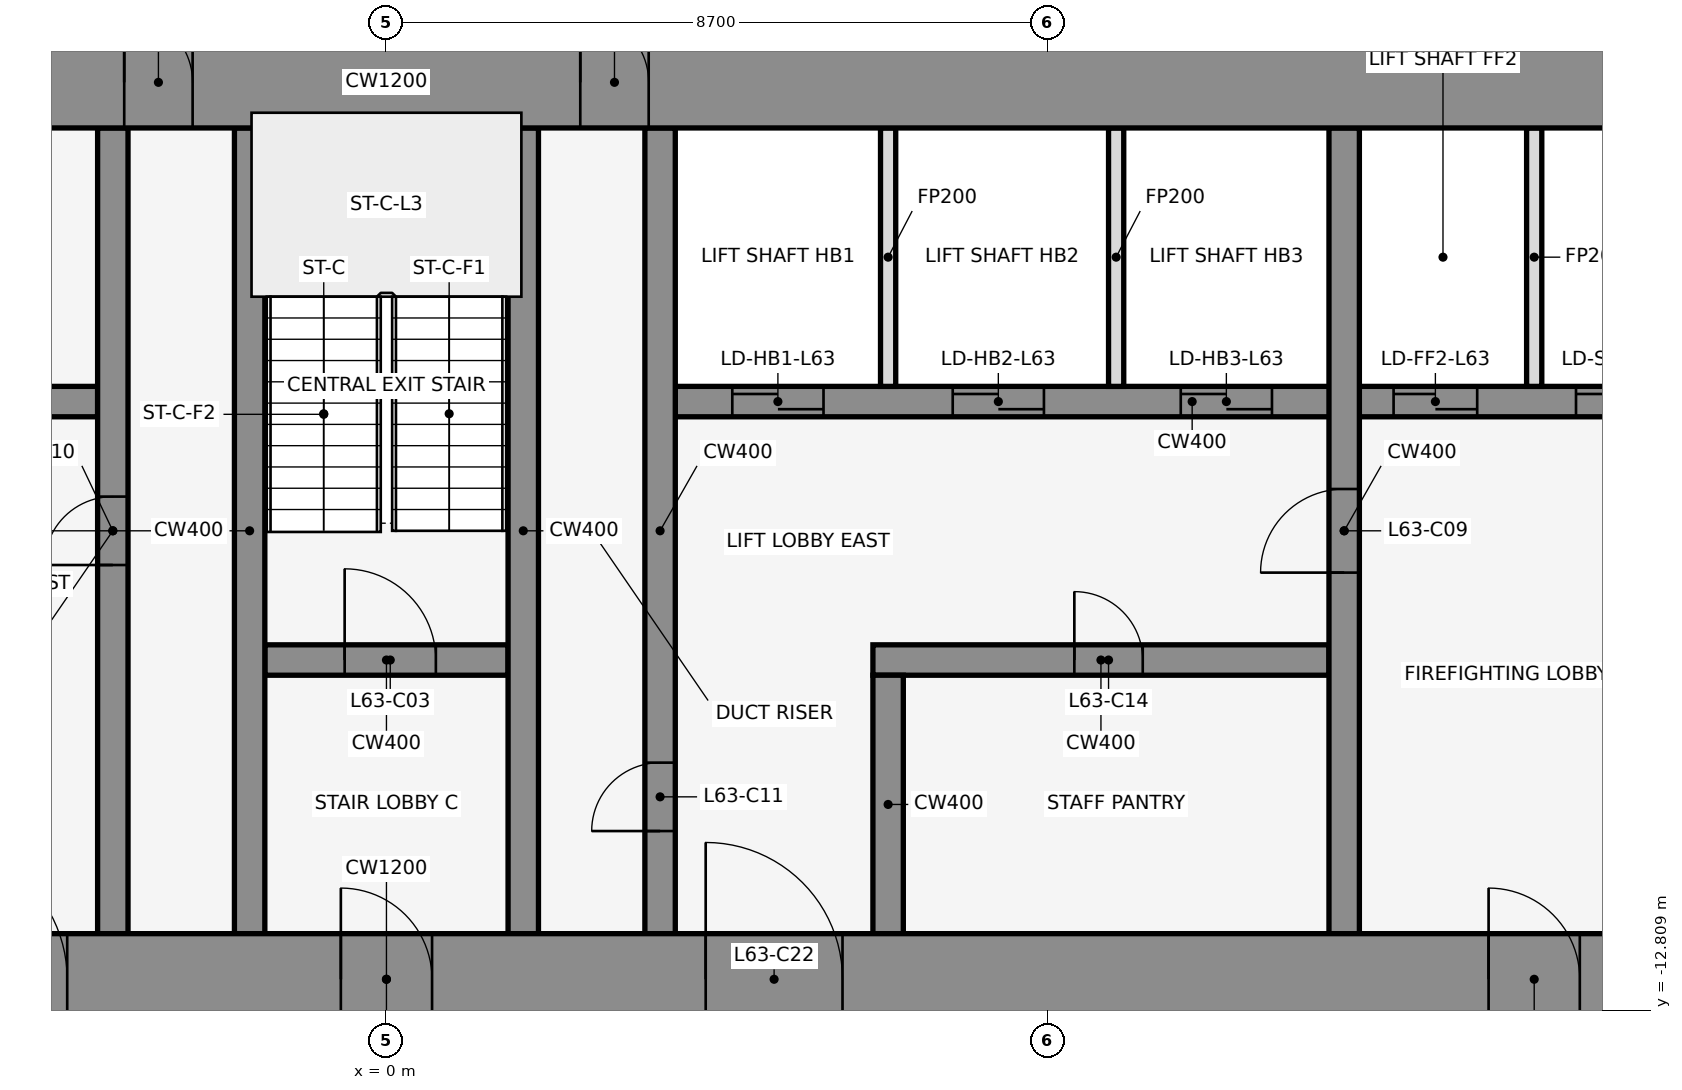
"""IFC4 building model, lengths in metres.
Left out: names, types, materials, properties, quantities, classifications, styles, units other than length and angle.
Written with IfcOpenShell. Run it as: python <this file> out.ifc"""

import sys

from ifc_helpers import new_model, si_unit, direction, frame, frame_2d, origin, place, context, subcontext, project, spatial, rectangle, extrude, element, fill, save


model = new_model("IFC4")
c1 = context("Model", 3, precision=1e-05, world=origin(), true_north=direction((0.0, 1.0)))
c2 = subcontext(c1, "Body", "Model", "MODEL_VIEW")
j1 = project(units=[si_unit("LENGTHUNIT", "METRE"), si_unit("PLANEANGLEUNIT", "RADIAN")], contexts=[c1])
p1 = place(None, origin())
s1 = spatial("IfcSite", under=j1, at=p1, CompositionType="ELEMENT")
p2 = place(p1, origin())
s2 = spatial("IfcBuilding", under=s1, at=p2, CompositionType="ELEMENT")
p3 = place(p2, frame((0.0, 0.0, 279.2)))
s3 = spatial("IfcBuildingStorey", under=s2, at=p3, CompositionType="ELEMENT", Elevation=279.2)
for number, where, z_axis, x_axis in (
    (1, (16.432, -0.105, 0.0), (0.0, 0.0, 1.0), (-0.84, 0.543, 0.0)),
    (2, (1.901, 1.08, 0.0), (0.0, 0.0, 1.0), (-0.84, -0.543, 0.0)),
    (3, (-0.068, -0.105, 0.0), (0.0, 0.0, 1.0), (-0.84, 0.543, 0.0)),
):
    element("IfcWall", number, at=place(p3, frame(where, z_axis=z_axis, x_axis=x_axis)), inside=s3, PredefinedType="STANDARD", context=c2, shape_type="SweptSolid", body=[
        extrude(rectangle(XDim=2.183, YDim=0.25, at=frame_2d((1.091, 0.0))), origin(), (0.0, 0.0, 1.0), 4.05),
    ])
p4 = place(p3, frame((-1.6, -8.2, 0.0), z_axis=(0.0, 0.0, 1.0), x_axis=(1.0, 0.0, 0.0)))
e4 = element("IfcWall", 4, at=p4, inside=s3, PredefinedType="SHEAR", context=c2, shape_type="SweptSolid", body=[
    extrude(rectangle(XDim=3.2, YDim=0.4, at=frame_2d((1.6, 0.0))), origin(), (0.0, 0.0, 1.0), 4.2),
])
p5 = place(p4, frame((1.05, 0.0, 0.0)))
e5 = element("IfcOpeningElement", 5, at=p5, cuts=e4, PredefinedType="OPENING", context=c2, shape_type="SweptSolid", body=[
    extrude(rectangle(XDim=1.2, YDim=2.1, at=frame_2d((0.6, 1.05))), frame((0.0, 0.212, 0.0), z_axis=(0.0, -1.0, 0.0), x_axis=(1.0, 0.0, 0.0)), (0.0, 0.0, 1.0), 0.424),
])
p6 = place(p3, frame((6.4, -8.2, 0.0), z_axis=(0.0, 0.0, 1.0), x_axis=(1.0, 0.0, 0.0)))
e6 = element("IfcWall", 6, at=p6, inside=s3, PredefinedType="SHEAR", context=c2, shape_type="SweptSolid", body=[
    extrude(rectangle(XDim=6.0, YDim=0.4, at=frame_2d((3.0, 0.0))), origin(), (0.0, 0.0, 1.0), 4.2),
])
p7 = place(p6, frame((2.65, 0.0, 0.0)))
e7 = element("IfcOpeningElement", 7, at=p7, cuts=e6, PredefinedType="OPENING", context=c2, shape_type="SweptSolid", body=[
    extrude(rectangle(XDim=0.9, YDim=2.1, at=frame_2d((0.45, 1.05))), frame((0.0, 0.212, 0.0), z_axis=(0.0, -1.0, 0.0), x_axis=(1.0, 0.0, 0.0)), (0.0, 0.0, 1.0), 0.424),
])
p8 = place(p3, frame((-17.4, -4.8, 0.0), z_axis=(0.0, 0.0, 1.0), x_axis=(1.0, 0.0, 0.0)))
e8 = element("IfcWall", 8, at=p8, inside=s3, PredefinedType="SHEAR", context=c2, shape_type="SweptSolid", body=[
    extrude(rectangle(XDim=13.6, YDim=0.4, at=frame_2d((6.8, 0.0))), origin(), (0.0, 0.0, 1.0), 4.2),
])
p9 = place(p8, frame((0.65, 0.0, 0.0)))
e9 = element("IfcOpeningElement", 9, at=p9, cuts=e8, PredefinedType="OPENING", context=c2, shape_type="SweptSolid", body=[
    extrude(rectangle(XDim=1.1, YDim=2.1, at=frame_2d((0.55, 1.05))), frame((0.0, 0.212, 0.0), z_axis=(0.0, -1.0, 0.0), x_axis=(1.0, 0.0, 0.0)), (0.0, 0.0, 1.0), 0.424),
])
p10 = place(p8, frame((2.95, 0.0, 0.0)))
e10 = element("IfcOpeningElement", 10, at=p10, cuts=e8, PredefinedType="OPENING", context=c2, shape_type="SweptSolid", body=[
    extrude(rectangle(XDim=1.1, YDim=2.1, at=frame_2d((0.55, 1.05))), frame((0.0, 0.212, 0.0), z_axis=(0.0, -1.0, 0.0), x_axis=(1.0, 0.0, 0.0)), (0.0, 0.0, 1.0), 0.424),
])
p11 = place(p8, frame((8.75, 0.0, 0.0)))
e11 = element("IfcOpeningElement", 11, at=p11, cuts=e8, PredefinedType="OPENING", context=c2, shape_type="SweptSolid", body=[
    extrude(rectangle(XDim=0.9, YDim=2.1, at=frame_2d((0.45, 1.05))), frame((0.0, 0.212, 0.0), z_axis=(0.0, -1.0, 0.0), x_axis=(1.0, 0.0, 0.0)), (0.0, 0.0, 1.0), 0.424),
])
p12 = place(p3, frame((3.8, -4.8, 0.0), z_axis=(0.0, 0.0, 1.0), x_axis=(1.0, 0.0, 0.0)))
e12 = element("IfcWall", 12, at=p12, inside=s3, PredefinedType="SHEAR", context=c2, shape_type="SweptSolid", body=[
    extrude(rectangle(XDim=13.6, YDim=0.4, at=frame_2d((6.8, 0.0))), origin(), (0.0, 0.0, 1.0), 4.2),
])
p13 = place(p12, frame((0.75, 0.0, 0.0)))
e13 = element("IfcOpeningElement", 13, at=p13, cuts=e12, PredefinedType="OPENING", context=c2, shape_type="SweptSolid", body=[
    extrude(rectangle(XDim=1.2, YDim=2.1, at=frame_2d((0.6, 1.05))), frame((0.0, 0.212, 0.0), z_axis=(0.0, -1.0, 0.0), x_axis=(1.0, 0.0, 0.0)), (0.0, 0.0, 1.0), 0.424),
])
p14 = place(p12, frame((3.65, 0.0, 0.0)))
e14 = element("IfcOpeningElement", 14, at=p14, cuts=e12, PredefinedType="OPENING", context=c2, shape_type="SweptSolid", body=[
    extrude(rectangle(XDim=1.2, YDim=2.1, at=frame_2d((0.6, 1.05))), frame((0.0, 0.212, 0.0), z_axis=(0.0, -1.0, 0.0), x_axis=(1.0, 0.0, 0.0)), (0.0, 0.0, 1.0), 0.424),
])
p15 = place(p12, frame((6.65, 0.0, 0.0)))
e15 = element("IfcOpeningElement", 15, at=p15, cuts=e12, PredefinedType="OPENING", context=c2, shape_type="SweptSolid", body=[
    extrude(rectangle(XDim=1.2, YDim=2.1, at=frame_2d((0.6, 1.05))), frame((0.0, 0.212, 0.0), z_axis=(0.0, -1.0, 0.0), x_axis=(1.0, 0.0, 0.0)), (0.0, 0.0, 1.0), 0.424),
])
p16 = place(p12, frame((9.45, 0.0, 0.0)))
e16 = element("IfcOpeningElement", 16, at=p16, cuts=e12, PredefinedType="OPENING", context=c2, shape_type="SweptSolid", body=[
    extrude(rectangle(XDim=1.1, YDim=2.1, at=frame_2d((0.55, 1.05))), frame((0.0, 0.212, 0.0), z_axis=(0.0, -1.0, 0.0), x_axis=(1.0, 0.0, 0.0)), (0.0, 0.0, 1.0), 0.424),
])
p17 = place(p12, frame((11.85, 0.0, 0.0)))
e17 = element("IfcOpeningElement", 17, at=p17, cuts=e12, PredefinedType="OPENING", context=c2, shape_type="SweptSolid", body=[
    extrude(rectangle(XDim=1.1, YDim=2.1, at=frame_2d((0.55, 1.05))), frame((0.0, 0.212, 0.0), z_axis=(0.0, -1.0, 0.0), x_axis=(1.0, 0.0, 0.0)), (0.0, 0.0, 1.0), 0.424),
])
p18 = place(p3, frame((-3.6, -11.8, 0.0), z_axis=(0.0, 0.0, 1.0), x_axis=(0.0, 1.0, 0.0)))
e18 = element("IfcWall", 18, at=p18, inside=s3, PredefinedType="SHEAR", context=c2, shape_type="SweptSolid", body=[
    extrude(rectangle(XDim=10.6, YDim=0.4, at=frame_2d((5.3, 0.0))), origin(), (0.0, 0.0, 1.0), 4.2),
])
p19 = place(p18, frame((4.85, 0.0, 0.0)))
e19 = element("IfcOpeningElement", 19, at=p19, cuts=e18, PredefinedType="OPENING", context=c2, shape_type="SweptSolid", body=[
    extrude(rectangle(XDim=0.9, YDim=2.1, at=frame_2d((0.45, 1.05))), frame((0.0, 0.212, 0.0), z_axis=(0.0, -1.0, 0.0), x_axis=(1.0, 0.0, 0.0)), (0.0, 0.0, 1.0), 0.424),
])
for number, where, z_axis, x_axis in (
    (20, (-1.8, -11.8, 0.0), (0.0, 0.0, 1.0), (0.0, 1.0, 0.0)),
    (21, (1.8, -11.8, 0.0), (0.0, 0.0, 1.0), (0.0, 1.0, 0.0)),
):
    element("IfcWall", number, at=place(p3, frame(where, z_axis=z_axis, x_axis=x_axis)), inside=s3, PredefinedType="SHEAR", context=c2, shape_type="SweptSolid", body=[
        extrude(rectangle(XDim=10.6, YDim=0.4, at=frame_2d((5.3, 0.0))), origin(), (0.0, 0.0, 1.0), 4.2),
    ])
p20 = place(p3, frame((3.6, -11.8, 0.0), z_axis=(0.0, 0.0, 1.0), x_axis=(0.0, 1.0, 0.0)))
e22 = element("IfcWall", 22, at=p20, inside=s3, PredefinedType="SHEAR", context=c2, shape_type="SweptSolid", body=[
    extrude(rectangle(XDim=10.6, YDim=0.4, at=frame_2d((5.3, 0.0))), origin(), (0.0, 0.0, 1.0), 4.2),
])
p21 = place(p20, frame((1.35, 0.0, 0.0)))
e23 = element("IfcOpeningElement", 23, at=p21, cuts=e22, PredefinedType="OPENING", context=c2, shape_type="SweptSolid", body=[
    extrude(rectangle(XDim=0.9, YDim=2.1, at=frame_2d((0.45, 1.05))), frame((0.0, 0.212, 0.0), z_axis=(0.0, -1.0, 0.0), x_axis=(1.0, 0.0, 0.0)), (0.0, 0.0, 1.0), 0.424),
])
p22 = place(p3, frame((6.6, -11.8, 0.0), z_axis=(0.0, 0.0, 1.0), x_axis=(0.0, 1.0, 0.0)))
e24 = element("IfcWall", 24, at=p22, inside=s3, PredefinedType="SHEAR", context=c2, shape_type="SweptSolid", body=[
    extrude(rectangle(XDim=3.4, YDim=0.4, at=frame_2d((1.7, 0.0))), origin(), (0.0, 0.0, 1.0), 4.2),
])
for number, where, z_axis, x_axis in (
    (25, (6.6, -4.6, 0.0), (0.0, 0.0, 1.0), (0.0, 1.0, 0.0)),
    (26, (9.6, -4.6, 0.0), (0.0, 0.0, 1.0), (0.0, 1.0, 0.0)),
):
    element("IfcWall", number, at=place(p3, frame(where, z_axis=z_axis, x_axis=x_axis)), inside=s3, PredefinedType="PARTITIONING", context=c2, shape_type="SweptSolid", body=[
        extrude(rectangle(XDim=3.4, YDim=0.2, at=frame_2d((1.7, 0.0))), origin(), (0.0, 0.0, 1.0), 3.04),
    ])
p23 = place(p3, frame((12.6, -11.8, 0.0), z_axis=(0.0, 0.0, 1.0), x_axis=(0.0, 1.0, 0.0)))
e27 = element("IfcWall", 27, at=p23, inside=s3, PredefinedType="SHEAR", context=c2, shape_type="SweptSolid", body=[
    extrude(rectangle(XDim=10.6, YDim=0.4, at=frame_2d((5.3, 0.0))), origin(), (0.0, 0.0, 1.0), 4.2),
])
p24 = place(p23, frame((4.75, 0.0, 0.0)))
e28 = element("IfcOpeningElement", 28, at=p24, cuts=e27, PredefinedType="OPENING", context=c2, shape_type="SweptSolid", body=[
    extrude(rectangle(XDim=1.1, YDim=2.1, at=frame_2d((0.55, 1.05))), frame((0.0, 0.212, 0.0), z_axis=(0.0, -1.0, 0.0), x_axis=(1.0, 0.0, 0.0)), (0.0, 0.0, 1.0), 0.424),
])
p25 = place(p3, frame((15.1, -4.6, 0.0), z_axis=(0.0, 0.0, 1.0), x_axis=(0.0, 1.0, 0.0)))
e29 = element("IfcWall", 29, at=p25, inside=s3, PredefinedType="PARTITIONING", context=c2, shape_type="SweptSolid", body=[
    extrude(rectangle(XDim=3.4, YDim=0.2, at=frame_2d((1.7, 0.0))), origin(), (0.0, 0.0, 1.0), 3.04),
])
p26 = place(p3, frame((-22.0, -0.6, 0.0), z_axis=(0.0, 0.0, 1.0), x_axis=(1.0, 0.0, 0.0)))
e30 = element("IfcWall", 30, at=p26, inside=s3, PredefinedType="SHEAR", context=c2, shape_type="SweptSolid", body=[
    extrude(rectangle(XDim=44.0, YDim=1.2, at=frame_2d((22.0, 0.0))), origin(), (0.0, 0.0, 1.0), 4.2),
])
p27 = place(p26, frame((18.55, 0.0, 0.0)))
e31 = element("IfcOpeningElement", 31, at=p27, cuts=e30, PredefinedType="OPENING", context=c2, shape_type="SweptSolid", body=[
    extrude(rectangle(XDim=0.9, YDim=2.1, at=frame_2d((0.45, 1.05))), frame((0.0, 0.612, 0.0), z_axis=(0.0, -1.0, 0.0), x_axis=(1.0, 0.0, 0.0)), (0.0, 0.0, 1.0), 1.224),
])
p28 = place(p26, frame((24.55, 0.0, 0.0)))
e32 = element("IfcOpeningElement", 32, at=p28, cuts=e30, PredefinedType="OPENING", context=c2, shape_type="SweptSolid", body=[
    extrude(rectangle(XDim=0.9, YDim=2.1, at=frame_2d((0.45, 1.05))), frame((0.0, 0.612, 0.0), z_axis=(0.0, -1.0, 0.0), x_axis=(1.0, 0.0, 0.0)), (0.0, 0.0, 1.0), 1.224),
])
p29 = place(p3, frame((-22.0, -12.4, 0.0), z_axis=(0.0, 0.0, 1.0), x_axis=(1.0, 0.0, 0.0)))
e33 = element("IfcWall", 33, at=p29, inside=s3, PredefinedType="SHEAR", context=c2, shape_type="SweptSolid", body=[
    extrude(rectangle(XDim=44.0, YDim=1.2, at=frame_2d((22.0, 0.0))), origin(), (0.0, 0.0, 1.0), 4.2),
])
p30 = place(p29, frame((2.2, 0.0, 0.0)))
e34 = element("IfcOpeningElement", 34, at=p30, cuts=e33, PredefinedType="OPENING", context=c2, shape_type="SweptSolid", body=[
    extrude(rectangle(XDim=1.2, YDim=2.1, at=frame_2d((0.6, 1.05))), frame((0.0, 0.612, 0.0), z_axis=(0.0, -1.0, 0.0), x_axis=(1.0, 0.0, 0.0)), (0.0, 0.0, 1.0), 1.224),
])
p31 = place(p29, frame((21.4, 0.0, 0.0)))
e35 = element("IfcOpeningElement", 35, at=p31, cuts=e33, PredefinedType="OPENING", context=c2, shape_type="SweptSolid", body=[
    extrude(rectangle(XDim=1.2, YDim=2.1, at=frame_2d((0.6, 1.05))), frame((0.0, 0.612, 0.0), z_axis=(0.0, -1.0, 0.0), x_axis=(1.0, 0.0, 0.0)), (0.0, 0.0, 1.0), 1.224),
])
p32 = place(p29, frame((40.6, 0.0, 0.0)))
e36 = element("IfcOpeningElement", 36, at=p32, cuts=e33, PredefinedType="OPENING", context=c2, shape_type="SweptSolid", body=[
    extrude(rectangle(XDim=1.2, YDim=2.1, at=frame_2d((0.6, 1.05))), frame((0.0, 0.612, 0.0), z_axis=(0.0, -1.0, 0.0), x_axis=(1.0, 0.0, 0.0)), (0.0, 0.0, 1.0), 1.224),
])
p33 = place(p29, frame((16.0, 0.0, 0.0)))
e37 = element("IfcOpeningElement", 37, at=p33, cuts=e33, PredefinedType="OPENING", context=c2, shape_type="SweptSolid", body=[
    extrude(rectangle(XDim=1.8, YDim=2.1, at=frame_2d((0.9, 1.05))), frame((0.0, 0.612, 0.0), z_axis=(0.0, -1.0, 0.0), x_axis=(1.0, 0.0, 0.0)), (0.0, 0.0, 1.0), 1.224),
])
p34 = place(p29, frame((6.3, 0.0, 0.0)))
e38 = element("IfcOpeningElement", 38, at=p34, cuts=e33, PredefinedType="OPENING", context=c2, shape_type="SweptSolid", body=[
    extrude(rectangle(XDim=1.2, YDim=2.1, at=frame_2d((0.6, 1.05))), frame((0.0, 0.612, 0.0), z_axis=(0.0, -1.0, 0.0), x_axis=(1.0, 0.0, 0.0)), (0.0, 0.0, 1.0), 1.224),
])
p35 = place(p29, frame((26.2, 0.0, 0.0)))
e39 = element("IfcOpeningElement", 39, at=p35, cuts=e33, PredefinedType="OPENING", context=c2, shape_type="SweptSolid", body=[
    extrude(rectangle(XDim=1.8, YDim=2.1, at=frame_2d((0.9, 1.05))), frame((0.0, 0.612, 0.0), z_axis=(0.0, -1.0, 0.0), x_axis=(1.0, 0.0, 0.0)), (0.0, 0.0, 1.0), 1.224),
])
p36 = place(p29, frame((36.5, 0.0, 0.0)))
e40 = element("IfcOpeningElement", 40, at=p36, cuts=e33, PredefinedType="OPENING", context=c2, shape_type="SweptSolid", body=[
    extrude(rectangle(XDim=1.2, YDim=2.1, at=frame_2d((0.6, 1.05))), frame((0.0, 0.612, 0.0), z_axis=(0.0, -1.0, 0.0), x_axis=(1.0, 0.0, 0.0)), (0.0, 0.0, 1.0), 1.224),
])
p37 = place(p5, origin())
e41 = element("IfcDoor", 41, at=p37, inside=s3, OperationType="SINGLE_SWING_LEFT", PredefinedType="DOOR", context=c2, shape_type="SweptSolid", body=[
    extrude(rectangle(XDim=1.2, YDim=2.1, at=frame_2d((0.6, 1.05))), frame((0.0, 0.025, 0.0), z_axis=(0.0, -1.0, 0.0), x_axis=(1.0, 0.0, 0.0)), (0.0, 0.0, 1.0), 0.05),
])
fill(e5, e41)
p38 = place(p13, origin())
e42 = element("IfcDoor", 42, at=p38, inside=s3, OperationType="DOUBLE_DOOR_SLIDING", PredefinedType="DOOR", context=c2, shape_type="SweptSolid", body=[
    extrude(rectangle(XDim=1.2, YDim=2.1, at=frame_2d((0.6, 1.05))), frame((0.0, 0.025, 0.0), z_axis=(0.0, -1.0, 0.0), x_axis=(1.0, 0.0, 0.0)), (0.0, 0.0, 1.0), 0.05),
])
fill(e13, e42)
p39 = place(p14, origin())
e43 = element("IfcDoor", 43, at=p39, inside=s3, OperationType="DOUBLE_DOOR_SLIDING", PredefinedType="DOOR", context=c2, shape_type="SweptSolid", body=[
    extrude(rectangle(XDim=1.2, YDim=2.1, at=frame_2d((0.6, 1.05))), frame((0.0, 0.025, 0.0), z_axis=(0.0, -1.0, 0.0), x_axis=(1.0, 0.0, 0.0)), (0.0, 0.0, 1.0), 0.05),
])
fill(e14, e43)
p40 = place(p15, origin())
e44 = element("IfcDoor", 44, at=p40, inside=s3, OperationType="DOUBLE_DOOR_SLIDING", PredefinedType="DOOR", context=c2, shape_type="SweptSolid", body=[
    extrude(rectangle(XDim=1.2, YDim=2.1, at=frame_2d((0.6, 1.05))), frame((0.0, 0.025, 0.0), z_axis=(0.0, -1.0, 0.0), x_axis=(1.0, 0.0, 0.0)), (0.0, 0.0, 1.0), 0.05),
])
fill(e15, e44)
p41 = place(p16, origin())
e45 = element("IfcDoor", 45, at=p41, inside=s3, OperationType="DOUBLE_DOOR_SLIDING", PredefinedType="DOOR", context=c2, shape_type="SweptSolid", body=[
    extrude(rectangle(XDim=1.1, YDim=2.1, at=frame_2d((0.55, 1.05))), frame((0.0, 0.025, 0.0), z_axis=(0.0, -1.0, 0.0), x_axis=(1.0, 0.0, 0.0)), (0.0, 0.0, 1.0), 0.05),
])
fill(e16, e45)
p42 = place(p17, origin())
e46 = element("IfcDoor", 46, at=p42, inside=s3, OperationType="DOUBLE_DOOR_SLIDING", PredefinedType="DOOR", context=c2, shape_type="SweptSolid", body=[
    extrude(rectangle(XDim=1.1, YDim=2.1, at=frame_2d((0.55, 1.05))), frame((0.0, 0.025, 0.0), z_axis=(0.0, -1.0, 0.0), x_axis=(1.0, 0.0, 0.0)), (0.0, 0.0, 1.0), 0.05),
])
fill(e17, e46)
p43 = place(p24, frame((1.1, 0.0, 0.0), z_axis=(0.0, 0.0, 1.0), x_axis=(-1.0, 0.0, 0.0)))
e47 = element("IfcDoor", 47, at=p43, inside=s3, OperationType="SINGLE_SWING_RIGHT", PredefinedType="DOOR", context=c2, shape_type="SweptSolid", body=[
    extrude(rectangle(XDim=1.1, YDim=2.1, at=frame_2d((0.55, 1.05))), frame((0.0, 0.025, 0.0), z_axis=(0.0, -1.0, 0.0), x_axis=(1.0, 0.0, 0.0)), (0.0, 0.0, 1.0), 0.05),
])
fill(e28, e47)
p44 = place(p19, frame((0.9, 0.0, 0.0), z_axis=(0.0, 0.0, 1.0), x_axis=(-1.0, 0.0, 0.0)))
e48 = element("IfcDoor", 48, at=p44, inside=s3, OperationType="SINGLE_SWING_LEFT", PredefinedType="DOOR", context=c2, shape_type="SweptSolid", body=[
    extrude(rectangle(XDim=0.9, YDim=2.1, at=frame_2d((0.45, 1.05))), frame((0.0, 0.025, 0.0), z_axis=(0.0, -1.0, 0.0), x_axis=(1.0, 0.0, 0.0)), (0.0, 0.0, 1.0), 0.05),
])
fill(e19, e48)
p45 = place(p21, origin())
e49 = element("IfcDoor", 49, at=p45, inside=s3, OperationType="SINGLE_SWING_LEFT", PredefinedType="DOOR", context=c2, shape_type="SweptSolid", body=[
    extrude(rectangle(XDim=0.9, YDim=2.1, at=frame_2d((0.45, 1.05))), frame((0.0, 0.025, 0.0), z_axis=(0.0, -1.0, 0.0), x_axis=(1.0, 0.0, 0.0)), (0.0, 0.0, 1.0), 0.05),
])
fill(e23, e49)
p46 = place(p7, frame((0.9, 0.0, 0.0), z_axis=(0.0, 0.0, 1.0), x_axis=(-1.0, 0.0, 0.0)))
e50 = element("IfcDoor", 50, at=p46, inside=s3, OperationType="SINGLE_SWING_LEFT", PredefinedType="DOOR", context=c2, shape_type="SweptSolid", body=[
    extrude(rectangle(XDim=0.9, YDim=2.1, at=frame_2d((0.45, 1.05))), frame((0.0, 0.025, 0.0), z_axis=(0.0, -1.0, 0.0), x_axis=(1.0, 0.0, 0.0)), (0.0, 0.0, 1.0), 0.05),
])
fill(e7, e50)
p47 = place(p27, origin())
e51 = element("IfcDoor", 51, at=p47, inside=s3, OperationType="SINGLE_SWING_LEFT", PredefinedType="DOOR", context=c2, shape_type="SweptSolid", body=[
    extrude(rectangle(XDim=0.9, YDim=2.1, at=frame_2d((0.45, 1.05))), frame((0.0, 0.025, 0.0), z_axis=(0.0, -1.0, 0.0), x_axis=(1.0, 0.0, 0.0)), (0.0, 0.0, 1.0), 0.05),
])
fill(e31, e51)
p48 = place(p28, origin())
e52 = element("IfcDoor", 52, at=p48, inside=s3, OperationType="SINGLE_SWING_LEFT", PredefinedType="DOOR", context=c2, shape_type="SweptSolid", body=[
    extrude(rectangle(XDim=0.9, YDim=2.1, at=frame_2d((0.45, 1.05))), frame((0.0, 0.025, 0.0), z_axis=(0.0, -1.0, 0.0), x_axis=(1.0, 0.0, 0.0)), (0.0, 0.0, 1.0), 0.05),
])
fill(e32, e52)
p49 = place(p31, frame((1.2, 0.0, 0.0), z_axis=(0.0, 0.0, 1.0), x_axis=(-1.0, 0.0, 0.0)))
e53 = element("IfcDoor", 53, at=p49, inside=s3, OperationType="SINGLE_SWING_RIGHT", PredefinedType="DOOR", context=c2, shape_type="SweptSolid", body=[
    extrude(rectangle(XDim=1.2, YDim=2.1, at=frame_2d((0.6, 1.05))), frame((0.0, 0.025, 0.0), z_axis=(0.0, -1.0, 0.0), x_axis=(1.0, 0.0, 0.0)), (0.0, 0.0, 1.0), 0.05),
])
fill(e35, e53)
p50 = place(p33, origin())
e54 = element("IfcDoor", 54, at=p50, inside=s3, OperationType="SINGLE_SWING_LEFT", PredefinedType="DOOR", context=c2, shape_type="SweptSolid", body=[
    extrude(rectangle(XDim=1.8, YDim=2.1, at=frame_2d((0.9, 1.05))), frame((0.0, 0.025, 0.0), z_axis=(0.0, -1.0, 0.0), x_axis=(1.0, 0.0, 0.0)), (0.0, 0.0, 1.0), 0.05),
])
fill(e37, e54)
p51 = place(p35, origin())
e55 = element("IfcDoor", 55, at=p51, inside=s3, OperationType="SINGLE_SWING_LEFT", PredefinedType="DOOR", context=c2, shape_type="SweptSolid", body=[
    extrude(rectangle(XDim=1.8, YDim=2.1, at=frame_2d((0.9, 1.05))), frame((0.0, 0.025, 0.0), z_axis=(0.0, -1.0, 0.0), x_axis=(1.0, 0.0, 0.0)), (0.0, 0.0, 1.0), 0.05),
])
fill(e39, e55)
p52 = place(p36, frame((1.2, 0.0, 0.0), z_axis=(0.0, 0.0, 1.0), x_axis=(-1.0, 0.0, 0.0)))
e56 = element("IfcDoor", 56, at=p52, inside=s3, OperationType="SINGLE_SWING_RIGHT", PredefinedType="DOOR", context=c2, shape_type="SweptSolid", body=[
    extrude(rectangle(XDim=1.2, YDim=2.1, at=frame_2d((0.6, 1.05))), frame((0.0, 0.025, 0.0), z_axis=(0.0, -1.0, 0.0), x_axis=(1.0, 0.0, 0.0)), (0.0, 0.0, 1.0), 0.05),
])
fill(e40, e56)
save(model, sys.argv[1])
